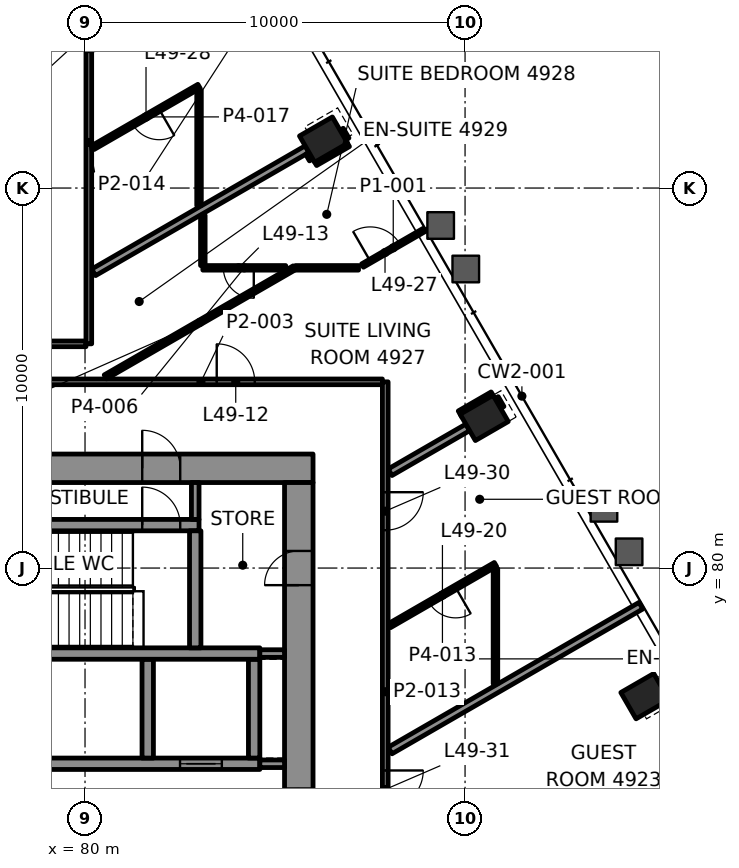
"""IFC4 building model, lengths in metres.
Left out: names, types, materials, properties, quantities, classifications, styles, units other than length and angle.
Written with IfcOpenShell. Run it as: python <this file> out.ifc"""

import sys

from ifc_helpers import new_model, si_unit, direction, frame, frame_2d, origin, origin_2d, place, context, subcontext, project, spatial, rectangle, hollow_rectangle, extrude, element, fill, save


model = new_model("IFC4")
c1 = context("Model", 3, precision=1e-05, world=origin(), true_north=direction((0.0, 1.0)))
c2 = subcontext(c1, "Body", "Model", "MODEL_VIEW")
j1 = project(units=[si_unit("LENGTHUNIT", "METRE"), si_unit("PLANEANGLEUNIT", "RADIAN")], contexts=[c1])
p1 = place(None, origin())
s1 = spatial("IfcSite", under=j1, at=p1, CompositionType="ELEMENT")
p2 = place(p1, origin())
s2 = spatial("IfcBuilding", under=s1, at=p2, CompositionType="ELEMENT")
p3 = place(p2, frame((0.0, 0.0, 210.4)))
s3 = spatial("IfcBuildingStorey", under=s2, at=p3, CompositionType="ELEMENT", Elevation=210.4)
for number, where, z_axis, x_axis in (
    (1, (94.732, 76.628, -0.0), (0.0, 0.0, 1.0), (-0.5, 0.866, 0.0)),
    (2, (90.504, 83.951, -0.0), (0.0, 0.0, 1.0), (-0.5, 0.866, 0.0)),
    (3, (86.276, 91.274, -0.0), (0.0, 0.0, 1.0), (-0.5, 0.866, 0.0)),
):
    element("IfcColumn", number, at=place(p3, frame(where, z_axis=z_axis, x_axis=x_axis)), inside=s3, PredefinedType="COLUMN", context=c2, shape_type="SweptSolid", body=[
        extrude(hollow_rectangle(XDim=0.8, YDim=1.0, WallThickness=0.05, at=origin_2d()), origin(), (0.0, 0.0, 1.0), 3.9),
    ])
p4 = place(p3, frame((64.0, 82.625, 0.0), z_axis=(0.0, 0.0, 1.0), x_axis=(1.0, 0.0, 0.0)))
e4 = element("IfcWall", 4, at=p4, inside=s3, PredefinedType="SHEAR", context=c2, shape_type="SweptSolid", body=[
    extrude(rectangle(XDim=22.0, YDim=0.75, at=frame_2d((11.0, 0.0))), origin(), (0.0, 0.0, 1.0), 3.7),
])
p5 = place(p4, frame((3.695, 0.0, 0.0)))
e5 = element("IfcOpeningElement", 5, at=p5, cuts=e4, PredefinedType="OPENING", context=c2, shape_type="SweptSolid", body=[
    extrude(rectangle(XDim=1.0, YDim=2.1, at=frame_2d((0.5, 1.05))), frame((0.0, 0.385, 0.0), z_axis=(0.0, -1.0, 0.0), x_axis=(1.0, 0.0, 0.0)), (0.0, 0.0, 1.0), 0.77),
])
p6 = place(p4, frame((17.505, 0.0, 0.0)))
e6 = element("IfcOpeningElement", 6, at=p6, cuts=e4, PredefinedType="OPENING", context=c2, shape_type="SweptSolid", body=[
    extrude(rectangle(XDim=1.0, YDim=2.1, at=frame_2d((0.5, 1.05))), frame((0.0, 0.385, 0.0), z_axis=(0.0, -1.0, 0.0), x_axis=(1.0, 0.0, 0.0)), (0.0, 0.0, 1.0), 0.77),
])
p7 = place(p4, frame((10.65, 0.0, 0.0)))
e7 = element("IfcOpeningElement", 7, at=p7, cuts=e4, PredefinedType="OPENING", context=c2, shape_type="SweptSolid", body=[
    extrude(rectangle(XDim=0.9, YDim=2.1, at=frame_2d((0.45, 1.05))), frame((0.0, 0.385, 0.0), z_axis=(0.0, -1.0, 0.0), x_axis=(1.0, 0.0, 0.0)), (0.0, 0.0, 1.0), 0.77),
])
p8 = place(p3, frame((85.625, 67.75, 0.0), z_axis=(0.0, 0.0, 1.0), x_axis=(0.0, 1.0, 0.0)))
e8 = element("IfcWall", 8, at=p8, inside=s3, PredefinedType="SHEAR", context=c2, shape_type="SweptSolid", body=[
    extrude(rectangle(XDim=14.5, YDim=0.75, at=frame_2d((7.25, 0.0))), origin(), (0.0, 0.0, 1.0), 3.7),
])
p9 = place(p8, frame((4.65, 0.0, 0.0)))
e9 = element("IfcOpeningElement", 9, at=p9, cuts=e8, PredefinedType="OPENING", context=c2, shape_type="SweptSolid", body=[
    extrude(rectangle(XDim=1.8, YDim=2.1, at=frame_2d((0.9, 1.05))), frame((0.0, 0.385, 0.0), z_axis=(0.0, -1.0, 0.0), x_axis=(1.0, 0.0, 0.0)), (0.0, 0.0, 1.0), 0.77),
])
p10 = place(p8, frame((11.8, 0.0, 0.0)))
e10 = element("IfcOpeningElement", 10, at=p10, cuts=e8, PredefinedType="OPENING", context=c2, shape_type="SweptSolid", body=[
    extrude(rectangle(XDim=0.9, YDim=2.1, at=frame_2d((0.45, 1.05))), frame((0.0, 0.385, 0.0), z_axis=(0.0, -1.0, 0.0), x_axis=(1.0, 0.0, 0.0)), (0.0, 0.0, 1.0), 0.77),
])
p11 = place(p3, frame((70.3, 74.85, 0.0), z_axis=(0.0, 0.0, 1.0), x_axis=(1.0, 0.0, 0.0)))
e11 = element("IfcWall", 11, at=p11, inside=s3, PredefinedType="SHEAR", context=c2, shape_type="SweptSolid", body=[
    extrude(rectangle(XDim=14.3, YDim=0.3, at=frame_2d((7.15, 0.0))), origin(), (0.0, 0.0, 1.0), 3.7),
])
p12 = place(p11, frame((3.8, 0.0, 0.0)))
e12 = element("IfcOpeningElement", 12, at=p12, cuts=e11, PredefinedType="OPENING", context=c2, shape_type="SweptSolid", body=[
    extrude(rectangle(XDim=1.1, YDim=2.1, at=frame_2d((0.55, 1.05))), frame((0.0, 0.16, 0.0), z_axis=(0.0, -1.0, 0.0), x_axis=(1.0, 0.0, 0.0)), (0.0, 0.0, 1.0), 0.32),
])
p13 = place(p11, frame((12.2, 0.0, 0.0)))
e13 = element("IfcOpeningElement", 13, at=p13, cuts=e11, PredefinedType="OPENING", context=c2, shape_type="SweptSolid", body=[
    extrude(rectangle(XDim=1.1, YDim=2.1, at=frame_2d((0.55, 1.05))), frame((0.0, 0.16, 0.0), z_axis=(0.0, -1.0, 0.0), x_axis=(1.0, 0.0, 0.0)), (0.0, 0.0, 1.0), 0.32),
])
for number, where, z_axis, x_axis in (
    (14, (81.65, 75.0, 0.0), (0.0, 0.0, 1.0), (0.0, 1.0, 0.0)),
    (15, (84.45, 75.0, 0.0), (0.0, 0.0, 1.0), (0.0, 1.0, 0.0)),
):
    element("IfcWall", number, at=place(p3, frame(where, z_axis=z_axis, x_axis=x_axis)), inside=s3, PredefinedType="SHEAR", context=c2, shape_type="SweptSolid", body=[
        extrude(rectangle(XDim=2.6, YDim=0.3, at=frame_2d((1.3, 0.0))), origin(), (0.0, 0.0, 1.0), 3.7),
    ])
p14 = place(p3, frame((67.15, 77.75, 0.0), z_axis=(0.0, 0.0, 1.0), x_axis=(1.0, 0.0, 0.0)))
e16 = element("IfcWall", 16, at=p14, inside=s3, PredefinedType="SHEAR", context=c2, shape_type="SweptSolid", body=[
    extrude(rectangle(XDim=17.45, YDim=0.3, at=frame_2d((8.725, 0.0))), origin(), (0.0, 0.0, 1.0), 3.7),
])
p15 = place(p14, frame((0.545, 0.0, 0.0)))
e17 = element("IfcOpeningElement", 17, at=p15, cuts=e16, PredefinedType="OPENING", context=c2, shape_type="SweptSolid", body=[
    extrude(rectangle(XDim=1.0, YDim=2.1, at=frame_2d((0.5, 1.05))), frame((0.0, 0.16, 0.0), z_axis=(0.0, -1.0, 0.0), x_axis=(1.0, 0.0, 0.0)), (0.0, 0.0, 1.0), 0.32),
])
p16 = place(p3, frame((76.14, 81.13, 0.0), z_axis=(0.0, 0.0, 1.0), x_axis=(1.0, 0.0, 0.0)))
e18 = element("IfcWall", 18, at=p16, inside=s3, PredefinedType="SHEAR", context=c2, shape_type="SweptSolid", body=[
    extrude(rectangle(XDim=6.86, YDim=0.3, at=frame_2d((3.43, 0.0))), origin(), (0.0, 0.0, 1.0), 3.7),
])
p17 = place(p16, frame((5.365, 0.0, 0.0)))
e19 = element("IfcOpeningElement", 19, at=p17, cuts=e18, PredefinedType="OPENING", context=c2, shape_type="SweptSolid", body=[
    extrude(rectangle(XDim=1.0, YDim=2.1, at=frame_2d((0.5, 1.05))), frame((0.0, 0.16, 0.0), z_axis=(0.0, -1.0, 0.0), x_axis=(1.0, 0.0, 0.0)), (0.0, 0.0, 1.0), 0.32),
])
p18 = place(p3, frame((82.9, 77.9, 0.0), z_axis=(0.0, 0.0, 1.0), x_axis=(0.0, 1.0, 0.0)))
e20 = element("IfcWall", 20, at=p18, inside=s3, PredefinedType="SHEAR", context=c2, shape_type="SweptSolid", body=[
    extrude(rectangle(XDim=3.08, YDim=0.3, at=frame_2d((1.54, 0.0))), origin(), (0.0, 0.0, 1.0), 3.7),
])
p19 = place(p3, frame((78.275, 84.9, 0.0), z_axis=(0.0, 0.0, 1.0), x_axis=(1.0, 0.0, 0.0)))
e21 = element("IfcWall", 21, at=p19, inside=s3, PredefinedType="PARTITIONING", context=c2, shape_type="SweptSolid", body=[
    extrude(rectangle(XDim=9.55, YDim=0.15, at=frame_2d((4.775, 0.0))), origin(), (0.0, 0.0, 1.0), 3.097),
])
p20 = place(p19, frame((5.191, 0.0, 0.0)))
e22 = element("IfcOpeningElement", 22, at=p20, cuts=e21, PredefinedType="OPENING", context=c2, shape_type="SweptSolid", body=[
    extrude(rectangle(XDim=1.0, YDim=2.1, at=frame_2d((0.5, 1.05))), frame((0.0, 0.085, 0.0), z_axis=(0.0, -1.0, 0.0), x_axis=(1.0, 0.0, 0.0)), (0.0, 0.0, 1.0), 0.17),
])
p21 = place(p3, frame((78.275, 85.9, 0.0), z_axis=(0.0, 0.0, 1.0), x_axis=(1.0, 0.0, 0.0)))
e23 = element("IfcWall", 23, at=p21, inside=s3, PredefinedType="PARTITIONING", context=c2, shape_type="SweptSolid", body=[
    extrude(rectangle(XDim=1.75, YDim=0.15, at=frame_2d((0.875, 0.0))), origin(), (0.0, 0.0, 1.0), 3.097),
])
p22 = place(p3, frame((85.281, 87.9, 0.0), z_axis=(0.0, 0.0, 1.0), x_axis=(-1.0, 0.0, 0.0)))
e24 = element("IfcWall", 24, at=p22, inside=s3, PredefinedType="PARTITIONING", context=c2, shape_type="SweptSolid", body=[
    extrude(rectangle(XDim=2.181, YDim=0.12, at=frame_2d((1.091, 0.0))), origin(), (0.0, 0.0, 1.0), 3.097),
])
p23 = place(p22, frame((0.841, 0.0, 0.0)))
e25 = element("IfcOpeningElement", 25, at=p23, cuts=e24, PredefinedType="OPENING", context=c2, shape_type="SweptSolid", body=[
    extrude(rectangle(XDim=0.8, YDim=2.1, at=frame_2d((0.4, 1.05))), frame((0.0, 0.07, 0.0), z_axis=(0.0, -1.0, 0.0), x_axis=(1.0, 0.0, 0.0)), (0.0, 0.0, 1.0), 0.14),
])
p24 = place(p3, frame((88.027, 75.198, 0.0), z_axis=(0.0, 0.0, 1.0), x_axis=(0.866028758719, 0.499994189038, 0.0)))
e26 = element("IfcWall", 26, at=p24, inside=s3, PredefinedType="PARTITIONING", context=c2, shape_type="SweptSolid", body=[
    extrude(rectangle(XDim=7.622, YDim=0.2, at=frame_2d((3.811, 0.0))), origin(), (0.0, 0.0, 1.0), 3.022),
])
p25 = place(p3, frame((90.8, 80.095, 0.0), z_axis=(0.0, 0.0, 1.0), x_axis=(-0.866029130051, -0.499993545862, 0.0)))
e27 = element("IfcWall", 27, at=p25, inside=s3, PredefinedType="PARTITIONING", context=c2, shape_type="SweptSolid", body=[
    extrude(rectangle(XDim=3.222, YDim=0.12, at=frame_2d((1.611, 0.0))), origin(), (0.0, 0.0, 1.0), 3.1),
])
p26 = place(p25, frame((1.211, 0.0, 0.0)))
e28 = element("IfcOpeningElement", 28, at=p26, cuts=e27, PredefinedType="OPENING", context=c2, shape_type="SweptSolid", body=[
    extrude(rectangle(XDim=0.8, YDim=2.1, at=frame_2d((0.4, 1.05))), frame((0.0, 0.07, 0.0), z_axis=(0.0, -1.0, 0.0), x_axis=(1.0, 0.0, 0.0)), (0.0, 0.0, 1.0), 0.14),
])
p27 = place(p3, frame((88.027, 82.521, 0.0), z_axis=(0.0, 0.0, 1.0), x_axis=(0.866032292145, 0.49998806882, 0.0)))
e29 = element("IfcWall", 29, at=p27, inside=s3, PredefinedType="PARTITIONING", context=c2, shape_type="SweptSolid", body=[
    extrude(rectangle(XDim=2.36, YDim=0.2, at=frame_2d((1.18, 0.0))), origin(), (0.0, 0.0, 1.0), 3.1),
])
p28 = place(p3, frame((89.871, 84.048, 0.0), z_axis=(0.0, 0.0, 1.0), x_axis=(0.866010750942, 0.50002537861, 0.0)))
e30 = element("IfcWall", 30, at=p28, inside=s3, PredefinedType="PARTITIONING", context=c2, shape_type="SweptSolid", body=[
    extrude(rectangle(XDim=1.0, YDim=0.2, at=frame_2d((0.5, 0.0))), origin(), (0.0, 0.0, 1.0), 3.022),
])
p29 = place(p3, frame((87.301, 87.96, 0.0), z_axis=(0.0, 0.0, 1.0), x_axis=(0.866000772924, 0.500042659475, 0.0)))
e31 = element("IfcWall", 31, at=p29, inside=s3, PredefinedType="PARTITIONING", context=c2, shape_type="SweptSolid", body=[
    extrude(rectangle(XDim=1.87, YDim=0.1, at=frame_2d((0.935, 0.0))), origin(), (0.0, 0.0, 1.0), 3.022),
])
p30 = place(p29, frame((0.235, 0.0, 0.0)))
e32 = element("IfcOpeningElement", 32, at=p30, cuts=e31, PredefinedType="OPENING", context=c2, shape_type="SweptSolid", body=[
    extrude(rectangle(XDim=0.9, YDim=2.1, at=frame_2d((0.45, 1.05))), frame((0.0, 0.06, 0.0), z_axis=(0.0, -1.0, 0.0), x_axis=(1.0, 0.0, 0.0)), (0.0, 0.0, 1.0), 0.12),
])
p31 = place(p3, frame((80.534, 85.03, 0.0), z_axis=(0.0, 0.0, 1.0), x_axis=(0.866014884179, 0.500018220049, 0.0)))
e33 = element("IfcWall", 33, at=p31, inside=s3, PredefinedType="PARTITIONING", context=c2, shape_type="SweptSolid", body=[
    extrude(rectangle(XDim=5.74, YDim=0.12, at=frame_2d((2.87, 0.0))), origin(), (0.0, 0.0, 1.0), 3.1),
])
p32 = place(p3, frame((86.043, 90.678, 0.0), z_axis=(0.0, 0.0, 1.0), x_axis=(0.866039090965, 0.499976292358, 0.0)))
e34 = element("IfcWall", 34, at=p32, inside=s3, PredefinedType="PARTITIONING", context=c2, shape_type="SweptSolid", body=[
    extrude(rectangle(XDim=0.999, YDim=0.2, at=frame_2d((0.5, 0.0))), origin(), (0.0, 0.0, 1.0), 3.022),
])
p33 = place(p3, frame((80.227, 87.782, 0.0), z_axis=(0.0, 0.0, 1.0), x_axis=(0.866028841934, 0.499994044904, 0.0)))
e35 = element("IfcWall", 35, at=p33, inside=s3, PredefinedType="PARTITIONING", context=c2, shape_type="SweptSolid", body=[
    extrude(rectangle(XDim=6.484, YDim=0.2, at=frame_2d((3.242, 0.0))), origin(), (0.0, 0.0, 1.0), 3.1),
])
p34 = place(p3, frame((83.0, 92.677, 0.0), z_axis=(0.0, 0.0, 1.0), x_axis=(-0.866029130051, -0.499993545862, 0.0)))
e36 = element("IfcWall", 36, at=p34, inside=s3, PredefinedType="PARTITIONING", context=c2, shape_type="SweptSolid", body=[
    extrude(rectangle(XDim=3.222, YDim=0.12, at=frame_2d((1.611, 0.0))), origin(), (0.0, 0.0, 1.0), 3.1),
])
p35 = place(p34, frame((1.211, 0.0, 0.0)))
e37 = element("IfcOpeningElement", 37, at=p35, cuts=e36, PredefinedType="OPENING", context=c2, shape_type="SweptSolid", body=[
    extrude(rectangle(XDim=0.8, YDim=2.1, at=frame_2d((0.4, 1.05))), frame((0.0, 0.07, 0.0), z_axis=(0.0, -1.0, 0.0), x_axis=(1.0, 0.0, 0.0)), (0.0, 0.0, 1.0), 0.14),
])
p36 = place(p3, frame((90.8, 76.955, 0.0), z_axis=(0.0, 0.0, 1.0), x_axis=(0.0, 1.0, 0.0)))
e38 = element("IfcWall", 38, at=p36, inside=s3, PredefinedType="PARTITIONING", context=c2, shape_type="SweptSolid", body=[
    extrude(rectangle(XDim=3.031, YDim=0.12, at=frame_2d((1.515, 0.0))), origin(), (0.0, 0.0, 1.0), 3.1),
])
p37 = place(p3, frame((87.9, 84.9, 0.0), z_axis=(0.0, 0.0, 1.0), x_axis=(0.0, -1.0, 0.0)))
e39 = element("IfcWall", 39, at=p37, inside=s3, PredefinedType="PARTITIONING", context=c2, shape_type="SweptSolid", body=[
    extrude(rectangle(XDim=16.309, YDim=0.15, at=frame_2d((8.154, 0.0))), origin(), (0.0, 0.0, 1.0), 3.1),
])
p38 = place(p37, frame((2.904, 0.0, 0.0)))
e40 = element("IfcOpeningElement", 40, at=p38, cuts=e39, PredefinedType="OPENING", context=c2, shape_type="SweptSolid", body=[
    extrude(rectangle(XDim=1.0, YDim=2.1, at=frame_2d((0.5, 1.05))), frame((0.0, 0.085, 0.0), z_axis=(0.0, -1.0, 0.0), x_axis=(1.0, 0.0, 0.0)), (0.0, 0.0, 1.0), 0.17),
])
p39 = place(p37, frame((10.227, 0.0, 0.0)))
e41 = element("IfcOpeningElement", 41, at=p39, cuts=e39, PredefinedType="OPENING", context=c2, shape_type="SweptSolid", body=[
    extrude(rectangle(XDim=1.0, YDim=2.1, at=frame_2d((0.5, 1.05))), frame((0.0, 0.085, 0.0), z_axis=(0.0, -1.0, 0.0), x_axis=(1.0, 0.0, 0.0)), (0.0, 0.0, 1.0), 0.17),
])
p40 = place(p3, frame((83.1, 87.96, 0.0), z_axis=(0.0, 0.0, 1.0), x_axis=(0.0, 1.0, 0.0)))
e42 = element("IfcWall", 42, at=p40, inside=s3, PredefinedType="PARTITIONING", context=c2, shape_type="SweptSolid", body=[
    extrude(rectangle(XDim=1.325, YDim=0.12, at=frame_2d((0.663, 0.0))), origin(), (0.0, 0.0, 1.0), 3.1),
])
p41 = place(p3, frame((83.0, 89.538, 0.0), z_axis=(0.0, 0.0, 1.0), x_axis=(0.0, 1.0, 0.0)))
e43 = element("IfcWall", 43, at=p41, inside=s3, PredefinedType="PARTITIONING", context=c2, shape_type="SweptSolid", body=[
    extrude(rectangle(XDim=3.031, YDim=0.12, at=frame_2d((1.515, 0.0))), origin(), (0.0, 0.0, 1.0), 3.1),
])
p42 = place(p3, frame((80.1, 96.5, 0.0), z_axis=(0.0, 0.0, 1.0), x_axis=(0.0, -1.0, 0.0)))
e44 = element("IfcWall", 44, at=p42, inside=s3, PredefinedType="PARTITIONING", context=c2, shape_type="SweptSolid", body=[
    extrude(rectangle(XDim=10.6, YDim=0.15, at=frame_2d((5.3, 0.0))), origin(), (0.0, 0.0, 1.0), 3.097),
])
p43 = place(p42, frame((1.92, 0.0, 0.0)))
e45 = element("IfcOpeningElement", 45, at=p43, cuts=e44, PredefinedType="OPENING", context=c2, shape_type="SweptSolid", body=[
    extrude(rectangle(XDim=1.0, YDim=2.1, at=frame_2d((0.5, 1.05))), frame((0.0, 0.085, 0.0), z_axis=(0.0, -1.0, 0.0), x_axis=(1.0, 0.0, 0.0)), (0.0, 0.0, 1.0), 0.17),
])
p44 = place(p3, frame((90.937, 84.201, 0.0), z_axis=(0.0, 0.0, 1.0), x_axis=(-0.500074377092, 0.865982457891, 0.0)))
e46 = element("IfcWall", 46, at=p44, inside=s3, PredefinedType="PARTITIONING", context=c2, shape_type="SweptSolid", body=[
    extrude(rectangle(XDim=0.3, YDim=0.2, at=frame_2d((0.15, 0.0))), origin(), (0.0, 0.0, 1.0), 3.1),
])
p45 = place(p3, frame((86.859, 91.264, 0.0), z_axis=(0.0, 0.0, 1.0), x_axis=(-0.500264001326, 0.865872928886, 0.0)))
e47 = element("IfcWall", 47, at=p45, inside=s3, PredefinedType="PARTITIONING", context=c2, shape_type="SweptSolid", body=[
    extrude(rectangle(XDim=0.299, YDim=0.2, at=frame_2d((0.149, 0.0))), origin(), (0.0, 0.0, 1.0), 3.1),
])
p46 = place(p3, frame((85.993, 90.764, 0.0), z_axis=(0.0, 0.0, 1.0), x_axis=(-0.500359323436, 0.865817848887, 0.0)))
e48 = element("IfcWall", 48, at=p46, inside=s3, PredefinedType="PARTITIONING", context=c2, shape_type="SweptSolid", body=[
    extrude(rectangle(XDim=0.199, YDim=0.2, at=frame_2d((0.1, 0.0))), origin(), (0.0, 0.0, 1.0), 3.1),
])
p47 = place(p3, frame((85.535, 87.9, 0.0), z_axis=(0.0, 0.0, 1.0), x_axis=(1.0, 0.0, 0.0)))
e49 = element("IfcWall", 49, at=p47, inside=s3, PredefinedType="PARTITIONING", context=c2, shape_type="SweptSolid", body=[
    extrude(rectangle(XDim=1.661, YDim=0.12, at=frame_2d((0.831, 0.0))), origin(), (0.0, 0.0, 1.0), 3.1),
])
for number, where, z_axis, x_axis in (
    (50, (84.6, 74.85, 0.0), (0.0, 0.0, 1.0), (1.0, 0.0, 0.0)),
    (51, (84.6, 77.75, 0.0), (0.0, 0.0, 1.0), (1.0, 0.0, 0.0)),
):
    element("IfcWall", number, at=place(p3, frame(where, z_axis=z_axis, x_axis=x_axis)), inside=s3, PredefinedType="PARTITIONING", context=c2, shape_type="SweptSolid", body=[
        extrude(rectangle(XDim=0.65, YDim=0.2, at=frame_2d((0.325, 0.0))), origin(), (0.0, 0.0, 1.0), 3.7),
    ])
p48 = place(p3, frame((82.9, 81.28, 0.0), z_axis=(0.0, 0.0, 1.0), x_axis=(0.0, 1.0, 0.0)))
e52 = element("IfcWall", 52, at=p48, inside=s3, PredefinedType="PARTITIONING", context=c2, shape_type="SweptSolid", body=[
    extrude(rectangle(XDim=0.97, YDim=0.2, at=frame_2d((0.485, 0.0))), origin(), (0.0, 0.0, 1.0), 3.7),
])
p49 = place(p20, origin())
e53 = element("IfcDoor", 53, at=p49, inside=s3, OperationType="SINGLE_SWING_RIGHT", PredefinedType="DOOR", context=c2, shape_type="SweptSolid", body=[
    extrude(rectangle(XDim=1.0, YDim=2.1, at=frame_2d((0.5, 1.05))), frame((0.0, 0.025, 0.0), z_axis=(0.0, -1.0, 0.0), x_axis=(1.0, 0.0, 0.0)), (0.0, 0.0, 1.0), 0.05),
])
fill(e22, e53)
p50 = place(p23, origin())
e54 = element("IfcDoor", 54, at=p50, inside=s3, OperationType="SINGLE_SWING_LEFT", PredefinedType="DOOR", context=c2, shape_type="SweptSolid", body=[
    extrude(rectangle(XDim=0.8, YDim=2.1, at=frame_2d((0.4, 1.05))), frame((0.0, 0.025, 0.0), z_axis=(0.0, -1.0, 0.0), x_axis=(1.0, 0.0, 0.0)), (0.0, 0.0, 1.0), 0.05),
])
fill(e25, e54)
p51 = place(p26, origin())
e55 = element("IfcDoor", 55, at=p51, inside=s3, OperationType="SINGLE_SWING_RIGHT", PredefinedType="DOOR", context=c2, shape_type="SweptSolid", body=[
    extrude(rectangle(XDim=0.8, YDim=2.1, at=frame_2d((0.4, 1.05))), frame((0.0, 0.025, 0.0), z_axis=(0.0, -1.0, 0.0), x_axis=(1.0, 0.0, 0.0)), (0.0, 0.0, 1.0), 0.05),
])
fill(e28, e55)
p52 = place(p30, origin())
e56 = element("IfcDoor", 56, at=p52, inside=s3, OperationType="SINGLE_SWING_LEFT", PredefinedType="DOOR", context=c2, shape_type="SweptSolid", body=[
    extrude(rectangle(XDim=0.9, YDim=2.1, at=frame_2d((0.45, 1.05))), frame((0.0, 0.025, 0.0), z_axis=(0.0, -1.0, 0.0), x_axis=(1.0, 0.0, 0.0)), (0.0, 0.0, 1.0), 0.05),
])
fill(e32, e56)
p53 = place(p35, origin())
e57 = element("IfcDoor", 57, at=p53, inside=s3, OperationType="SINGLE_SWING_LEFT", PredefinedType="DOOR", context=c2, shape_type="SweptSolid", body=[
    extrude(rectangle(XDim=0.8, YDim=2.1, at=frame_2d((0.4, 1.05))), frame((0.0, 0.025, 0.0), z_axis=(0.0, -1.0, 0.0), x_axis=(1.0, 0.0, 0.0)), (0.0, 0.0, 1.0), 0.05),
])
fill(e37, e57)
p54 = place(p38, origin())
e58 = element("IfcDoor", 58, at=p54, inside=s3, OperationType="SINGLE_SWING_LEFT", PredefinedType="DOOR", context=c2, shape_type="SweptSolid", body=[
    extrude(rectangle(XDim=1.0, YDim=2.1, at=frame_2d((0.5, 1.05))), frame((0.0, 0.025, 0.0), z_axis=(0.0, -1.0, 0.0), x_axis=(1.0, 0.0, 0.0)), (0.0, 0.0, 1.0), 0.05),
])
fill(e40, e58)
p55 = place(p39, origin())
e59 = element("IfcDoor", 59, at=p55, inside=s3, OperationType="SINGLE_SWING_LEFT", PredefinedType="DOOR", context=c2, shape_type="SweptSolid", body=[
    extrude(rectangle(XDim=1.0, YDim=2.1, at=frame_2d((0.5, 1.05))), frame((0.0, 0.025, 0.0), z_axis=(0.0, -1.0, 0.0), x_axis=(1.0, 0.0, 0.0)), (0.0, 0.0, 1.0), 0.05),
])
fill(e41, e59)
p56 = place(p43, origin())
e60 = element("IfcDoor", 60, at=p56, inside=s3, OperationType="SINGLE_SWING_RIGHT", PredefinedType="DOOR", context=c2, shape_type="SweptSolid", body=[
    extrude(rectangle(XDim=1.0, YDim=2.1, at=frame_2d((0.5, 1.05))), frame((0.0, 0.025, 0.0), z_axis=(0.0, -1.0, 0.0), x_axis=(1.0, 0.0, 0.0)), (0.0, 0.0, 1.0), 0.05),
])
fill(e45, e60)
p57 = place(p13, origin())
e61 = element("IfcDoor", 61, at=p57, inside=s3, OperationType="DOUBLE_DOOR_SLIDING", PredefinedType="DOOR", context=c2, shape_type="SweptSolid", body=[
    extrude(rectangle(XDim=1.1, YDim=2.1, at=frame_2d((0.55, 1.05))), frame((0.0, 0.025, 0.0), z_axis=(0.0, -1.0, 0.0), x_axis=(1.0, 0.0, 0.0)), (0.0, 0.0, 1.0), 0.05),
])
fill(e13, e61)
p58 = place(p17, origin())
e62 = element("IfcDoor", 62, at=p58, inside=s3, OperationType="SINGLE_SWING_RIGHT", PredefinedType="DOOR", context=c2, shape_type="SweptSolid", body=[
    extrude(rectangle(XDim=1.0, YDim=2.1, at=frame_2d((0.5, 1.05))), frame((0.0, 0.025, 0.0), z_axis=(0.0, -1.0, 0.0), x_axis=(1.0, 0.0, 0.0)), (0.0, 0.0, 1.0), 0.05),
])
fill(e19, e62)
p59 = place(p6, origin())
e63 = element("IfcDoor", 63, at=p59, inside=s3, OperationType="SINGLE_SWING_LEFT", PredefinedType="DOOR", context=c2, shape_type="SweptSolid", body=[
    extrude(rectangle(XDim=1.0, YDim=2.1, at=frame_2d((0.5, 1.05))), frame((0.0, 0.095, 0.0), z_axis=(0.0, -1.0, 0.0), x_axis=(1.0, 0.0, 0.0)), (0.0, 0.0, 1.0), 0.19),
])
fill(e6, e63)
p60 = place(p10, origin())
e64 = element("IfcDoor", 64, at=p60, inside=s3, OperationType="SINGLE_SWING_RIGHT", PredefinedType="DOOR", context=c2, shape_type="SweptSolid", body=[
    extrude(rectangle(XDim=0.9, YDim=2.1, at=frame_2d((0.45, 1.05))), frame((0.0, 0.095, 0.0), z_axis=(0.0, -1.0, 0.0), x_axis=(1.0, 0.0, 0.0)), (0.0, 0.0, 1.0), 0.19),
])
fill(e10, e64)
save(model, sys.argv[1])
